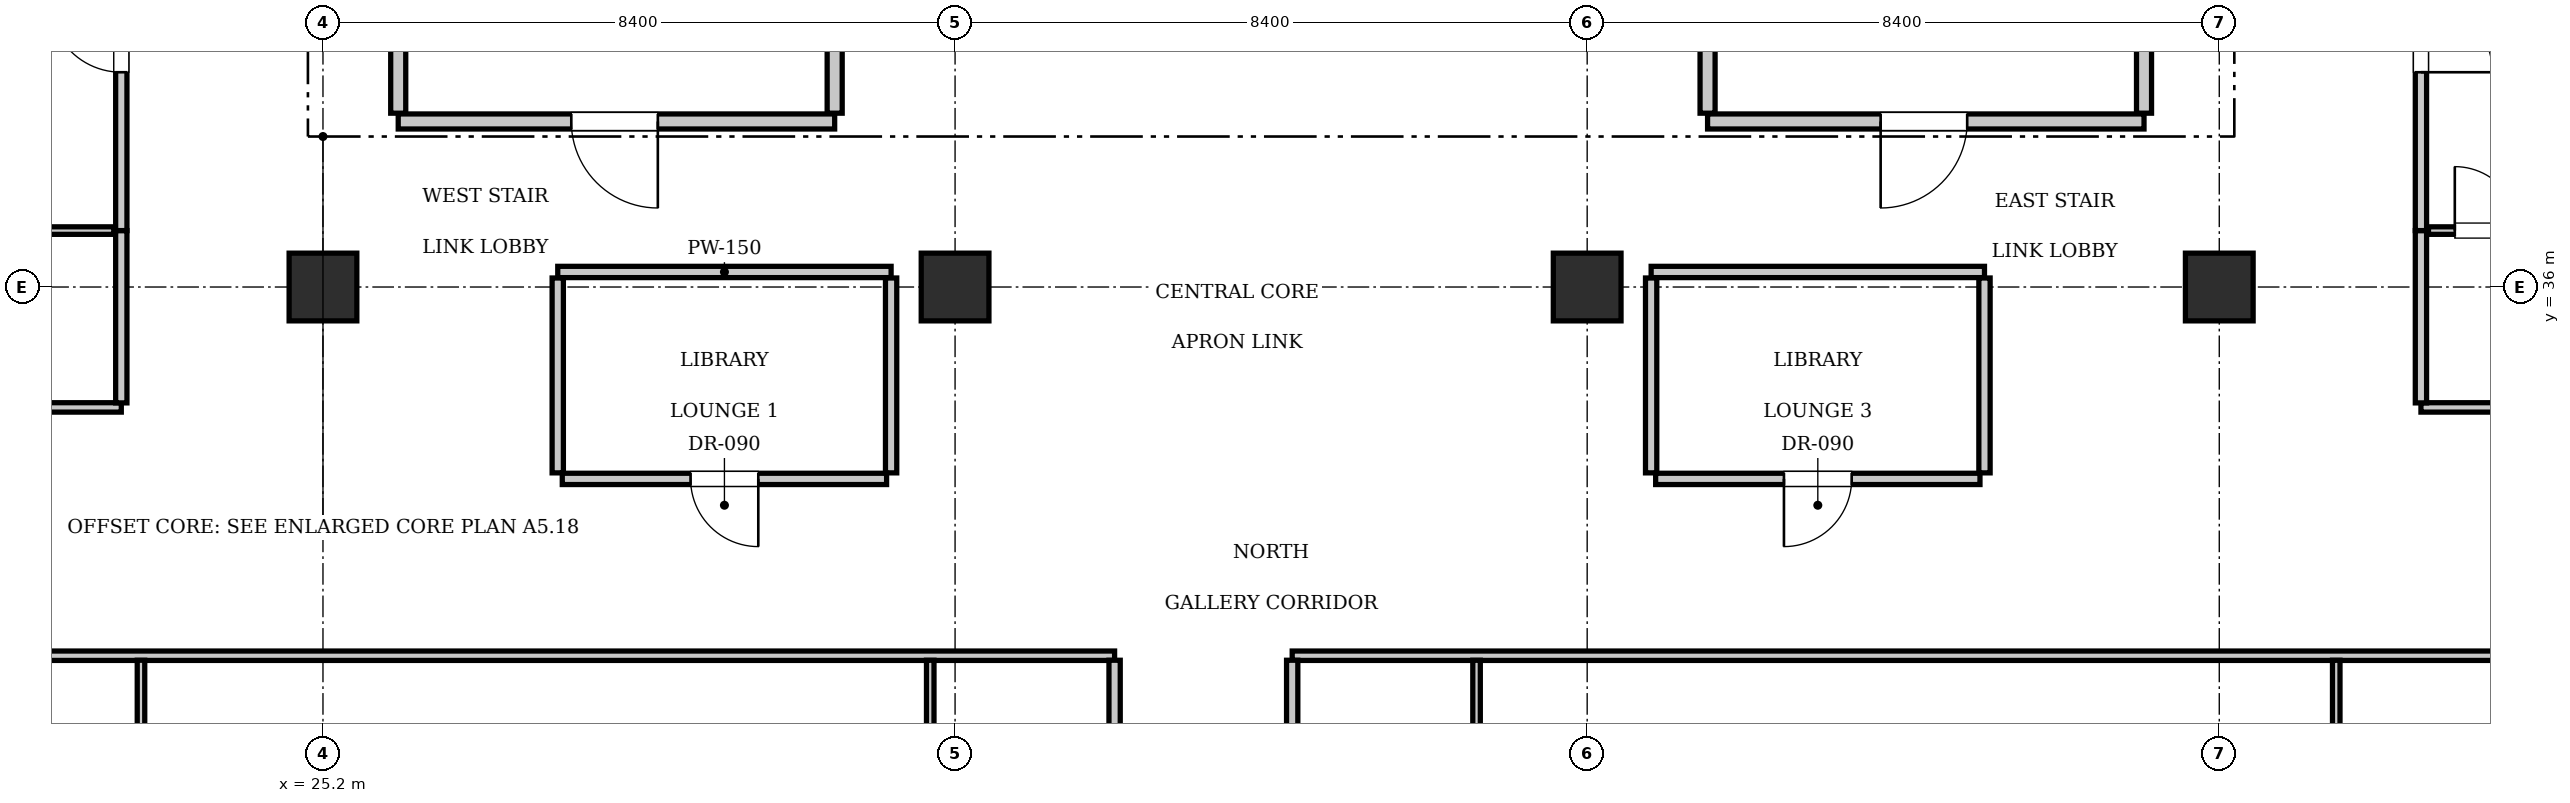
"""IFC4 building model, lengths in metres.
Left out: names, types, materials, properties, quantities, classifications, styles, units other than length and angle.
Written with IfcOpenShell. Run it as: python <this file> out.ifc"""

import sys

from ifc_helpers import new_model, si_unit, direction, frame, frame_2d, origin, origin_2d, place, context, subcontext, project, spatial, rectangle, extrude, element, fill, save


model = new_model("IFC4")
c1 = context("Model", 3, precision=1e-05, world=origin(), true_north=direction((0.0, 1.0)))
c2 = subcontext(c1, "Body", "Model", "MODEL_VIEW")
j1 = project(units=[si_unit("LENGTHUNIT", "METRE"), si_unit("PLANEANGLEUNIT", "RADIAN")], contexts=[c1])
p1 = place(None, origin())
s1 = spatial("IfcSite", under=j1, at=p1, CompositionType="ELEMENT")
p2 = place(p1, origin())
s2 = spatial("IfcBuilding", under=s1, at=p2, CompositionType="ELEMENT")
p3 = place(p2, frame((0.0, 0.0, 189.0)))
s3 = spatial("IfcBuildingStorey", under=s2, at=p3, CompositionType="ELEMENT", Elevation=189.0)
for number, where, z_axis, x_axis in (
    (1, (25.2, 36.0, 0.0), (0.0, 0.0, 1.0), (1.0, 0.0, 0.0)),
    (2, (33.6, 36.0, 0.0), (0.0, 0.0, 1.0), (1.0, 0.0, 0.0)),
    (3, (42.0, 36.0, 0.0), (0.0, 0.0, 1.0), (1.0, 0.0, 0.0)),
    (4, (50.4, 36.0, 0.0), (0.0, 0.0, 1.0), (1.0, 0.0, 0.0)),
):
    element("IfcColumn", number, at=place(p3, frame(where, z_axis=z_axis, x_axis=x_axis)), inside=s3, PredefinedType="COLUMN", context=c2, shape_type="SweptSolid", body=[
        extrude(rectangle(XDim=0.9, YDim=0.9, at=origin_2d()), origin(), (0.0, 0.0, 1.0), 3.85),
    ])
p4 = place(p3, frame((26.2, 38.2, 0.0), z_axis=(0.0, 0.0, 1.0), x_axis=(1.0, 0.0, 0.0)))
e5 = element("IfcWall", 5, at=p4, inside=s3, PredefinedType="PARTITIONING", context=c2, shape_type="SweptSolid", body=[
    extrude(rectangle(XDim=5.8, YDim=0.2, at=frame_2d((2.9, 0.0))), origin(), (0.0, 0.0, 1.0), 3.61),
])
p5 = place(p4, frame((2.3, 0.0, 0.0)))
e6 = element("IfcOpeningElement", 6, at=p5, cuts=e5, PredefinedType="OPENING", context=c2, shape_type="SweptSolid", body=[
    extrude(rectangle(XDim=1.15, YDim=2.15, at=frame_2d((0.575, 1.075))), frame((0.0, 0.11, 0.0), z_axis=(0.0, -1.0, 0.0), x_axis=(1.0, 0.0, 0.0)), (0.0, 0.0, 1.0), 0.22),
])
for number, where, z_axis, x_axis in (
    (7, (26.2, 38.31, 0.0), (0.0, 0.0, 1.0), (0.0, 1.0, 0.0)),
    (8, (32.0, 38.31, 0.0), (0.0, 0.0, 1.0), (0.0, 1.0, 0.0)),
):
    element("IfcWall", number, at=place(p3, frame(where, z_axis=z_axis, x_axis=x_axis)), inside=s3, PredefinedType="PARTITIONING", context=c2, shape_type="SweptSolid", body=[
        extrude(rectangle(XDim=3.07, YDim=0.2, at=frame_2d((1.535, 0.0))), origin(), (0.0, 0.0, 1.0), 3.61),
    ])
p6 = place(p3, frame((43.6, 38.2, 0.0), z_axis=(0.0, 0.0, 1.0), x_axis=(1.0, 0.0, 0.0)))
e9 = element("IfcWall", 9, at=p6, inside=s3, PredefinedType="PARTITIONING", context=c2, shape_type="SweptSolid", body=[
    extrude(rectangle(XDim=5.8, YDim=0.2, at=frame_2d((2.9, 0.0))), origin(), (0.0, 0.0, 1.0), 3.61),
])
p7 = place(p6, frame((2.3, 0.0, 0.0)))
e10 = element("IfcOpeningElement", 10, at=p7, cuts=e9, PredefinedType="OPENING", context=c2, shape_type="SweptSolid", body=[
    extrude(rectangle(XDim=1.15, YDim=2.15, at=frame_2d((0.575, 1.075))), frame((0.0, 0.11, 0.0), z_axis=(0.0, -1.0, 0.0), x_axis=(1.0, 0.0, 0.0)), (0.0, 0.0, 1.0), 0.22),
])
for number, where, z_axis, x_axis in (
    (11, (43.6, 38.31, 0.0), (0.0, 0.0, 1.0), (0.0, 1.0, 0.0)),
    (12, (49.4, 38.31, 0.0), (0.0, 0.0, 1.0), (0.0, 1.0, 0.0)),
):
    element("IfcWall", number, at=place(p3, frame(where, z_axis=z_axis, x_axis=x_axis)), inside=s3, PredefinedType="PARTITIONING", context=c2, shape_type="SweptSolid", body=[
        extrude(rectangle(XDim=3.07, YDim=0.2, at=frame_2d((1.535, 0.0))), origin(), (0.0, 0.0, 1.0), 3.61),
    ])
p8 = place(p3, frame((28.32, 36.2, 0.0), z_axis=(0.0, 0.0, 1.0), x_axis=(1.0, 0.0, 0.0)))
e13 = element("IfcWall", 13, at=p8, inside=s3, PredefinedType="PARTITIONING", context=c2, shape_type="SweptSolid", body=[
    extrude(rectangle(XDim=4.43, YDim=0.15, at=frame_2d((2.215, 0.0))), origin(), (0.0, 0.0, 1.0), 3.61),
])
for number, where, z_axis, x_axis in (
    (14, (28.32, 33.53, 0.0), (0.0, 0.0, 1.0), (0.0, 1.0, 0.0)),
    (15, (32.75, 33.53, 0.0), (0.0, 0.0, 1.0), (0.0, 1.0, 0.0)),
):
    element("IfcWall", number, at=place(p3, frame(where, z_axis=z_axis, x_axis=x_axis)), inside=s3, PredefinedType="PARTITIONING", context=c2, shape_type="SweptSolid", body=[
        extrude(rectangle(XDim=2.59, YDim=0.15, at=frame_2d((1.295, 0.0))), origin(), (0.0, 0.0, 1.0), 3.61),
    ])
p9 = place(p3, frame((28.38, 33.45, 0.0), z_axis=(0.0, 0.0, 1.0), x_axis=(1.0, 0.0, 0.0)))
e16 = element("IfcWall", 16, at=p9, inside=s3, PredefinedType="PARTITIONING", context=c2, shape_type="SweptSolid", body=[
    extrude(rectangle(XDim=4.31, YDim=0.15, at=frame_2d((2.155, 0.0))), origin(), (0.0, 0.0, 1.0), 3.61),
])
p10 = place(p9, frame((1.705, 0.0, 0.0)))
e17 = element("IfcOpeningElement", 17, at=p10, cuts=e16, PredefinedType="OPENING", context=c2, shape_type="SweptSolid", body=[
    extrude(rectangle(XDim=0.9, YDim=2.1, at=frame_2d((0.45, 1.05))), frame((0.0, 0.085, 0.0), z_axis=(0.0, -1.0, 0.0), x_axis=(1.0, 0.0, 0.0)), (0.0, 0.0, 1.0), 0.17),
])
p11 = place(p3, frame((42.85, 36.2, 0.0), z_axis=(0.0, 0.0, 1.0), x_axis=(1.0, 0.0, 0.0)))
e18 = element("IfcWall", 18, at=p11, inside=s3, PredefinedType="PARTITIONING", context=c2, shape_type="SweptSolid", body=[
    extrude(rectangle(XDim=4.43, YDim=0.15, at=frame_2d((2.215, 0.0))), origin(), (0.0, 0.0, 1.0), 3.61),
])
for number, where, z_axis, x_axis in (
    (19, (42.85, 33.53, 0.0), (0.0, 0.0, 1.0), (0.0, 1.0, 0.0)),
    (20, (47.28, 33.53, 0.0), (0.0, 0.0, 1.0), (0.0, 1.0, 0.0)),
):
    element("IfcWall", number, at=place(p3, frame(where, z_axis=z_axis, x_axis=x_axis)), inside=s3, PredefinedType="PARTITIONING", context=c2, shape_type="SweptSolid", body=[
        extrude(rectangle(XDim=2.59, YDim=0.15, at=frame_2d((1.295, 0.0))), origin(), (0.0, 0.0, 1.0), 3.61),
    ])
p12 = place(p3, frame((42.91, 33.45, 0.0), z_axis=(0.0, 0.0, 1.0), x_axis=(1.0, 0.0, 0.0)))
e21 = element("IfcWall", 21, at=p12, inside=s3, PredefinedType="PARTITIONING", context=c2, shape_type="SweptSolid", body=[
    extrude(rectangle(XDim=4.31, YDim=0.15, at=frame_2d((2.155, 0.0))), origin(), (0.0, 0.0, 1.0), 3.61),
])
p13 = place(p12, frame((1.705, 0.0, 0.0)))
e22 = element("IfcOpeningElement", 22, at=p13, cuts=e21, PredefinedType="OPENING", context=c2, shape_type="SweptSolid", body=[
    extrude(rectangle(XDim=0.9, YDim=2.1, at=frame_2d((0.45, 1.05))), frame((0.0, 0.085, 0.0), z_axis=(0.0, -1.0, 0.0), x_axis=(1.0, 0.0, 0.0)), (0.0, 0.0, 1.0), 0.17),
])
p14 = place(p3, frame((13.2, 31.1, 0.0), z_axis=(0.0, 0.0, 1.0), x_axis=(1.0, 0.0, 0.0)))
e23 = element("IfcWall", 23, at=p14, inside=s3, PredefinedType="PARTITIONING", context=c2, shape_type="SweptSolid", body=[
    extrude(rectangle(XDim=22.52, YDim=0.125, at=frame_2d((11.26, 0.0))), origin(), (0.0, 0.0, 1.0), 3.61),
])
p15 = place(p3, frame((38.08, 31.1, 0.0), z_axis=(0.0, 0.0, 1.0), x_axis=(1.0, 0.0, 0.0)))
e24 = element("IfcWall", 24, at=p15, inside=s3, PredefinedType="PARTITIONING", context=c2, shape_type="SweptSolid", body=[
    extrude(rectangle(XDim=24.32, YDim=0.125, at=frame_2d((12.16, 0.0))), origin(), (0.0, 0.0, 1.0), 3.61),
])
p16 = place(p3, frame((35.72, 29.15, 0.0), z_axis=(0.0, 0.0, 1.0), x_axis=(0.0, 1.0, 0.0)))
e25 = element("IfcWall", 25, at=p16, inside=s3, PredefinedType="PARTITIONING", context=c2, shape_type="SweptSolid", body=[
    extrude(rectangle(XDim=1.89, YDim=0.15, at=frame_2d((0.945, 0.0))), origin(), (0.0, 0.0, 1.0), 3.61),
])
p17 = place(p3, frame((33.27, 29.15, 0.0), z_axis=(0.0, 0.0, 1.0), x_axis=(0.0, 1.0, 0.0)))
e26 = element("IfcWall", 26, at=p17, inside=s3, PredefinedType="PARTITIONING", context=c2, shape_type="SweptSolid", body=[
    extrude(rectangle(XDim=1.89, YDim=0.1, at=frame_2d((0.945, 0.0))), origin(), (0.0, 0.0, 1.0), 3.61),
])
p18 = place(p3, frame((22.781, 27.46, 0.0), z_axis=(0.0, 0.0, 1.0), x_axis=(0.0, 1.0, 0.0)))
e27 = element("IfcWall", 27, at=p18, inside=s3, PredefinedType="PARTITIONING", context=c2, shape_type="SweptSolid", body=[
    extrude(rectangle(XDim=3.58, YDim=0.1, at=frame_2d((1.79, 0.0))), origin(), (0.0, 0.0, 1.0), 3.61),
])
p19 = place(p18, frame((1.34, 0.0, 0.0)))
e28 = element("IfcOpeningElement", 28, at=p19, cuts=e27, PredefinedType="OPENING", context=c2, shape_type="SweptSolid", body=[
    extrude(rectangle(XDim=0.9, YDim=2.1, at=frame_2d((0.45, 1.05))), frame((0.0, 0.06, 0.0), z_axis=(0.0, -1.0, 0.0), x_axis=(1.0, 0.0, 0.0)), (0.0, 0.0, 1.0), 0.12),
])
p20 = place(p3, frame((38.08, 29.15, 0.0), z_axis=(0.0, 0.0, 1.0), x_axis=(0.0, 1.0, 0.0)))
e29 = element("IfcWall", 29, at=p20, inside=s3, PredefinedType="PARTITIONING", context=c2, shape_type="SweptSolid", body=[
    extrude(rectangle(XDim=1.89, YDim=0.15, at=frame_2d((0.945, 0.0))), origin(), (0.0, 0.0, 1.0), 3.61),
])
p21 = place(p3, frame((40.53, 29.15, 0.0), z_axis=(0.0, 0.0, 1.0), x_axis=(0.0, 1.0, 0.0)))
e30 = element("IfcWall", 30, at=p21, inside=s3, PredefinedType="PARTITIONING", context=c2, shape_type="SweptSolid", body=[
    extrude(rectangle(XDim=1.89, YDim=0.1, at=frame_2d((0.945, 0.0))), origin(), (0.0, 0.0, 1.0), 3.61),
])
p22 = place(p3, frame((51.954, 27.46, 0.0), z_axis=(0.0, 0.0, 1.0), x_axis=(0.0, 1.0, 0.0)))
e31 = element("IfcWall", 31, at=p22, inside=s3, PredefinedType="PARTITIONING", context=c2, shape_type="SweptSolid", body=[
    extrude(rectangle(XDim=3.58, YDim=0.1, at=frame_2d((1.79, 0.0))), origin(), (0.0, 0.0, 1.0), 3.61),
])
p23 = place(p22, frame((1.34, 0.0, 0.0)))
e32 = element("IfcOpeningElement", 32, at=p23, cuts=e31, PredefinedType="OPENING", context=c2, shape_type="SweptSolid", body=[
    extrude(rectangle(XDim=0.9, YDim=2.1, at=frame_2d((0.45, 1.05))), frame((0.0, 0.06, 0.0), z_axis=(0.0, -1.0, 0.0), x_axis=(1.0, 0.0, 0.0)), (0.0, 0.0, 1.0), 0.12),
])
p24 = place(p3, frame((13.2, 34.4, 0.0), z_axis=(0.0, 0.0, 1.0), x_axis=(1.0, 0.0, 0.0)))
e33 = element("IfcWall", 33, at=p24, inside=s3, PredefinedType="PARTITIONING", context=c2, shape_type="SweptSolid", body=[
    extrude(rectangle(XDim=9.32, YDim=0.125, at=frame_2d((4.66, 0.0))), origin(), (0.0, 0.0, 1.0), 3.61),
])
p25 = place(p3, frame((53.08, 34.4, 0.0), z_axis=(0.0, 0.0, 1.0), x_axis=(1.0, 0.0, 0.0)))
e34 = element("IfcWall", 34, at=p25, inside=s3, PredefinedType="PARTITIONING", context=c2, shape_type="SweptSolid", body=[
    extrude(rectangle(XDim=9.32, YDim=0.125, at=frame_2d((4.66, 0.0))), origin(), (0.0, 0.0, 1.0), 3.61),
])
p26 = place(p3, frame((22.52, 34.46, 0.0), z_axis=(0.0, 0.0, 1.0), x_axis=(0.0, 1.0, 0.0)))
e35 = element("IfcWall", 35, at=p26, inside=s3, PredefinedType="PARTITIONING", context=c2, shape_type="SweptSolid", body=[
    extrude(rectangle(XDim=2.29, YDim=0.15, at=frame_2d((1.145, 0.0))), origin(), (0.0, 0.0, 1.0), 3.61),
])
p27 = place(p3, frame((22.52, 36.75, 0.0), z_axis=(0.0, 0.0, 1.0), x_axis=(0.0, 1.0, 0.0)))
e36 = element("IfcWall", 36, at=p27, inside=s3, PredefinedType="PARTITIONING", context=c2, shape_type="SweptSolid", body=[
    extrude(rectangle(XDim=5.159, YDim=0.15, at=frame_2d((2.579, 0.0))), origin(), (0.0, 0.0, 1.0), 3.61),
])
p28 = place(p27, frame((2.104, 0.0, 0.0)))
e37 = element("IfcOpeningElement", 37, at=p28, cuts=e36, PredefinedType="OPENING", context=c2, shape_type="SweptSolid", body=[
    extrude(rectangle(XDim=0.95, YDim=2.15, at=frame_2d((0.475, 1.075))), frame((0.0, 0.085, 0.0), z_axis=(0.0, -1.0, 0.0), x_axis=(1.0, 0.0, 0.0)), (0.0, 0.0, 1.0), 0.17),
])
p29 = place(p3, frame((20.12, 36.75, 0.0), z_axis=(0.0, 0.0, 1.0), x_axis=(1.0, 0.0, 0.0)))
e38 = element("IfcWall", 38, at=p29, inside=s3, PredefinedType="PARTITIONING", context=c2, shape_type="SweptSolid", body=[
    extrude(rectangle(XDim=2.3, YDim=0.1, at=frame_2d((1.15, 0.0))), origin(), (0.0, 0.0, 1.0), 3.61),
])
p30 = place(p29, frame((0.35, 0.0, 0.0)))
e39 = element("IfcOpeningElement", 39, at=p30, cuts=e38, PredefinedType="OPENING", context=c2, shape_type="SweptSolid", body=[
    extrude(rectangle(XDim=0.85, YDim=2.1, at=frame_2d((0.425, 1.05))), frame((0.0, 0.06, 0.0), z_axis=(0.0, -1.0, 0.0), x_axis=(1.0, 0.0, 0.0)), (0.0, 0.0, 1.0), 0.12),
])
p31 = place(p3, frame((53.08, 34.46, 0.0), z_axis=(0.0, 0.0, 1.0), x_axis=(0.0, 1.0, 0.0)))
e40 = element("IfcWall", 40, at=p31, inside=s3, PredefinedType="PARTITIONING", context=c2, shape_type="SweptSolid", body=[
    extrude(rectangle(XDim=2.29, YDim=0.15, at=frame_2d((1.145, 0.0))), origin(), (0.0, 0.0, 1.0), 3.61),
])
p32 = place(p3, frame((53.08, 36.75, 0.0), z_axis=(0.0, 0.0, 1.0), x_axis=(0.0, 1.0, 0.0)))
e41 = element("IfcWall", 41, at=p32, inside=s3, PredefinedType="PARTITIONING", context=c2, shape_type="SweptSolid", body=[
    extrude(rectangle(XDim=5.159, YDim=0.15, at=frame_2d((2.579, 0.0))), origin(), (0.0, 0.0, 1.0), 3.61),
])
p33 = place(p32, frame((2.104, 0.0, 0.0)))
e42 = element("IfcOpeningElement", 42, at=p33, cuts=e41, PredefinedType="OPENING", context=c2, shape_type="SweptSolid", body=[
    extrude(rectangle(XDim=0.95, YDim=2.15, at=frame_2d((0.475, 1.075))), frame((0.0, 0.085, 0.0), z_axis=(0.0, -1.0, 0.0), x_axis=(1.0, 0.0, 0.0)), (0.0, 0.0, 1.0), 0.17),
])
p34 = place(p3, frame((53.18, 36.75, 0.0), z_axis=(0.0, 0.0, 1.0), x_axis=(1.0, 0.0, 0.0)))
e43 = element("IfcWall", 43, at=p34, inside=s3, PredefinedType="PARTITIONING", context=c2, shape_type="SweptSolid", body=[
    extrude(rectangle(XDim=2.3, YDim=0.1, at=frame_2d((1.15, 0.0))), origin(), (0.0, 0.0, 1.0), 3.61),
])
p35 = place(p34, frame((0.35, 0.0, 0.0)))
e44 = element("IfcOpeningElement", 44, at=p35, cuts=e43, PredefinedType="OPENING", context=c2, shape_type="SweptSolid", body=[
    extrude(rectangle(XDim=0.85, YDim=2.1, at=frame_2d((0.425, 1.05))), frame((0.0, 0.06, 0.0), z_axis=(0.0, -1.0, 0.0), x_axis=(1.0, 0.0, 0.0)), (0.0, 0.0, 1.0), 0.12),
])
p36 = place(p5, frame((1.15, 0.0, 0.0), z_axis=(0.0, 0.0, 1.0), x_axis=(-1.0, 0.0, 0.0)))
e45 = element("IfcDoor", 45, at=p36, inside=s3, OperationType="SINGLE_SWING_LEFT", PredefinedType="DOOR", context=c2, shape_type="SweptSolid", body=[
    extrude(rectangle(XDim=1.15, YDim=2.15, at=frame_2d((0.575, 1.075))), frame((0.0, 0.025, 0.0), z_axis=(0.0, -1.0, 0.0), x_axis=(1.0, 0.0, 0.0)), (0.0, 0.0, 1.0), 0.05),
])
fill(e6, e45)
p37 = place(p7, frame((1.15, 0.0, 0.0), z_axis=(0.0, 0.0, 1.0), x_axis=(-1.0, 0.0, 0.0)))
e46 = element("IfcDoor", 46, at=p37, inside=s3, OperationType="SINGLE_SWING_RIGHT", PredefinedType="DOOR", context=c2, shape_type="SweptSolid", body=[
    extrude(rectangle(XDim=1.15, YDim=2.15, at=frame_2d((0.575, 1.075))), frame((0.0, 0.025, 0.0), z_axis=(0.0, -1.0, 0.0), x_axis=(1.0, 0.0, 0.0)), (0.0, 0.0, 1.0), 0.05),
])
fill(e10, e46)
p38 = place(p10, frame((0.9, 0.0, 0.0), z_axis=(0.0, 0.0, 1.0), x_axis=(-1.0, 0.0, 0.0)))
e47 = element("IfcDoor", 47, at=p38, inside=s3, OperationType="SINGLE_SWING_LEFT", PredefinedType="DOOR", context=c2, shape_type="SweptSolid", body=[
    extrude(rectangle(XDim=0.9, YDim=2.1, at=frame_2d((0.45, 1.05))), frame((0.0, 0.025, 0.0), z_axis=(0.0, -1.0, 0.0), x_axis=(1.0, 0.0, 0.0)), (0.0, 0.0, 1.0), 0.05),
])
fill(e17, e47)
p39 = place(p13, frame((0.9, 0.0, 0.0), z_axis=(0.0, 0.0, 1.0), x_axis=(-1.0, 0.0, 0.0)))
e48 = element("IfcDoor", 48, at=p39, inside=s3, OperationType="SINGLE_SWING_RIGHT", PredefinedType="DOOR", context=c2, shape_type="SweptSolid", body=[
    extrude(rectangle(XDim=0.9, YDim=2.1, at=frame_2d((0.45, 1.05))), frame((0.0, 0.025, 0.0), z_axis=(0.0, -1.0, 0.0), x_axis=(1.0, 0.0, 0.0)), (0.0, 0.0, 1.0), 0.05),
])
fill(e22, e48)
p40 = place(p28, origin())
e49 = element("IfcDoor", 49, at=p40, inside=s3, OperationType="SINGLE_SWING_RIGHT", PredefinedType="DOOR", context=c2, shape_type="SweptSolid", body=[
    extrude(rectangle(XDim=0.95, YDim=2.15, at=frame_2d((0.475, 1.075))), frame((0.0, 0.025, 0.0), z_axis=(0.0, -1.0, 0.0), x_axis=(1.0, 0.0, 0.0)), (0.0, 0.0, 1.0), 0.05),
])
fill(e37, e49)
p41 = place(p35, origin())
e50 = element("IfcDoor", 50, at=p41, inside=s3, OperationType="SINGLE_SWING_LEFT", PredefinedType="DOOR", context=c2, shape_type="SweptSolid", body=[
    extrude(rectangle(XDim=0.85, YDim=2.1, at=frame_2d((0.425, 1.05))), frame((0.0, 0.025, 0.0), z_axis=(0.0, -1.0, 0.0), x_axis=(1.0, 0.0, 0.0)), (0.0, 0.0, 1.0), 0.05),
])
fill(e44, e50)
p42 = place(p33, frame((0.95, 0.0, 0.0), z_axis=(0.0, 0.0, 1.0), x_axis=(-1.0, 0.0, 0.0)))
e51 = element("IfcDoor", 51, at=p42, inside=s3, OperationType="SINGLE_SWING_RIGHT", PredefinedType="DOOR", context=c2, shape_type="SweptSolid", body=[
    extrude(rectangle(XDim=0.95, YDim=2.15, at=frame_2d((0.475, 1.075))), frame((0.0, 0.025, 0.0), z_axis=(0.0, -1.0, 0.0), x_axis=(1.0, 0.0, 0.0)), (0.0, 0.0, 1.0), 0.05),
])
fill(e42, e51)
save(model, sys.argv[1])
